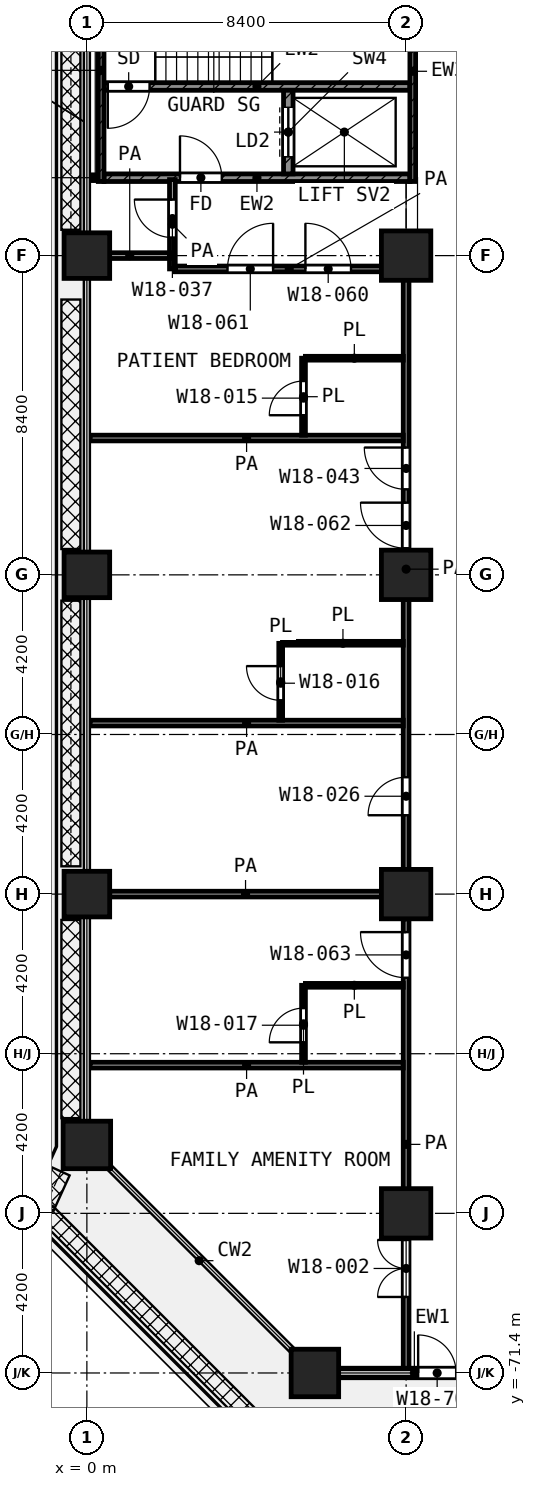
"""IFC4 building model, lengths in metres.
Left out: names, types, materials, properties, quantities, classifications, styles, units other than length and angle.
Written with IfcOpenShell. Run it as: python <this file> out.ifc"""

import sys

from ifc_helpers import new_model, si_unit, direction, frame, frame_2d, origin, origin_2d, place, context, subcontext, project, spatial, rectangle, extrude, element, fill, save


model = new_model("IFC4")
c1 = context("Model", 3, precision=1e-05, world=origin(), true_north=direction((0.0, 1.0)))
c2 = subcontext(c1, "Body", "Model", "MODEL_VIEW")
j1 = project(units=[si_unit("LENGTHUNIT", "METRE"), si_unit("PLANEANGLEUNIT", "RADIAN")], contexts=[c1])
p1 = place(None, origin())
s1 = spatial("IfcSite", under=j1, at=p1, CompositionType="ELEMENT")
p2 = place(p1, origin())
s2 = spatial("IfcBuilding", under=s1, at=p2, CompositionType="ELEMENT")
p3 = place(p2, frame((0.0, 0.0, 81.2)))
s3 = spatial("IfcBuildingStorey", under=s2, at=p3, CompositionType="ELEMENT", Elevation=81.2)
p4 = place(p3, frame((0.0, -42.0, 0.0), z_axis=(0.0, 0.0, 1.0), x_axis=(1.0, 0.0, 0.0)))
e1 = element("IfcColumn", 1, at=p4, inside=s3, PredefinedType="COLUMN", context=c2, shape_type="SweptSolid", body=[
    extrude(rectangle(XDim=1.2, YDim=1.2, at=origin_2d()), origin(), (0.0, 0.0, 1.0), 4.2),
])
p5 = place(p3, frame((8.4, -42.0, 0.0), z_axis=(0.0, 0.0, 1.0), x_axis=(1.0, 0.0, 0.0)))
e2 = element("IfcColumn", 2, at=p5, inside=s3, PredefinedType="COLUMN", context=c2, shape_type="SweptSolid", body=[
    extrude(rectangle(XDim=1.3, YDim=1.3, at=origin_2d()), origin(), (0.0, 0.0, 1.0), 4.2),
])
p6 = place(p3, frame((0.0, -50.4, 0.0), z_axis=(0.0, 0.0, 1.0), x_axis=(1.0, 0.0, 0.0)))
e3 = element("IfcColumn", 3, at=p6, inside=s3, PredefinedType="COLUMN", context=c2, shape_type="SweptSolid", body=[
    extrude(rectangle(XDim=1.2, YDim=1.2, at=origin_2d()), origin(), (0.0, 0.0, 1.0), 4.2),
])
p7 = place(p3, frame((8.4, -50.4, 0.0), z_axis=(0.0, 0.0, 1.0), x_axis=(1.0, 0.0, 0.0)))
e4 = element("IfcColumn", 4, at=p7, inside=s3, PredefinedType="COLUMN", context=c2, shape_type="SweptSolid", body=[
    extrude(rectangle(XDim=1.3, YDim=1.3, at=origin_2d()), origin(), (0.0, 0.0, 1.0), 4.2),
])
p8 = place(p3, frame((0.0, -58.8, 0.0), z_axis=(0.0, 0.0, 1.0), x_axis=(1.0, 0.0, 0.0)))
e5 = element("IfcColumn", 5, at=p8, inside=s3, PredefinedType="COLUMN", context=c2, shape_type="SweptSolid", body=[
    extrude(rectangle(XDim=1.2, YDim=1.2, at=origin_2d()), origin(), (0.0, 0.0, 1.0), 4.2),
])
p9 = place(p3, frame((8.4, -58.8, 0.0), z_axis=(0.0, 0.0, 1.0), x_axis=(1.0, 0.0, 0.0)))
e6 = element("IfcColumn", 6, at=p9, inside=s3, PredefinedType="COLUMN", context=c2, shape_type="SweptSolid", body=[
    extrude(rectangle(XDim=1.3, YDim=1.3, at=origin_2d()), origin(), (0.0, 0.0, 1.0), 4.2),
])
p10 = place(p3, frame((0.0, -65.4, 0.0), z_axis=(0.0, 0.0, 1.0), x_axis=(1.0, 0.0, 0.0)))
e7 = element("IfcColumn", 7, at=p10, inside=s3, PredefinedType="COLUMN", context=c2, shape_type="SweptSolid", body=[
    extrude(rectangle(XDim=1.25, YDim=1.25, at=origin_2d()), origin(), (0.0, 0.0, 1.0), 4.2),
])
p11 = place(p3, frame((8.4, -67.2, 0.0), z_axis=(0.0, 0.0, 1.0), x_axis=(1.0, 0.0, 0.0)))
e8 = element("IfcColumn", 8, at=p11, inside=s3, PredefinedType="COLUMN", context=c2, shape_type="SweptSolid", body=[
    extrude(rectangle(XDim=1.3, YDim=1.3, at=origin_2d()), origin(), (0.0, 0.0, 1.0), 4.2),
])
p12 = place(p3, frame((6.0, -71.4, 0.0), z_axis=(0.0, 0.0, 1.0), x_axis=(1.0, 0.0, 0.0)))
e9 = element("IfcColumn", 9, at=p12, inside=s3, PredefinedType="COLUMN", context=c2, shape_type="SweptSolid", body=[
    extrude(rectangle(XDim=1.25, YDim=1.25, at=origin_2d()), origin(), (0.0, 0.0, 1.0), 4.2),
])
p13 = place(p3, frame((6.625, -71.4, 0.0), z_axis=(0.0, 0.0, 1.0), x_axis=(1.0, 0.0, 0.0)))
e10 = element("IfcWall", 10, at=p13, inside=s3, PredefinedType="SOLIDWALL", context=c2, shape_type="SweptSolid", body=[
    extrude(rectangle(XDim=3.983, YDim=0.25, at=frame_2d((1.992, 0.0))), origin(), (0.0, 0.0, 1.0), 3.78),
])
p14 = place(p13, frame((2.092, 0.0, 0.0)))
e11 = element("IfcOpeningElement", 11, at=p14, cuts=e10, PredefinedType="OPENING", context=c2, shape_type="SweptSolid", body=[
    extrude(rectangle(XDim=1.0, YDim=2.1, at=frame_2d((0.5, 1.05))), frame((0.0, 0.135, 0.0), z_axis=(0.0, -1.0, 0.0), x_axis=(1.0, 0.0, 0.0)), (0.0, 0.0, 1.0), 0.27),
])
p15 = place(p3, frame((0.375, -40.05, 0.0), z_axis=(0.0, 0.0, 1.0), x_axis=(0.0, 1.0, 0.0)))
e12 = element("IfcWall", 12, at=p15, inside=s3, PredefinedType="SHEAR", context=c2, shape_type="SweptSolid", body=[
    extrude(rectangle(XDim=5.85, YDim=0.15, at=frame_2d((2.925, 0.0))), origin(), (0.0, 0.0, 1.0), 3.9),
])
p16 = place(p3, frame((8.575, -40.05, 0.0), z_axis=(0.0, 0.0, 1.0), x_axis=(0.0, 1.0, 0.0)))
e13 = element("IfcWall", 13, at=p16, inside=s3, PredefinedType="SHEAR", context=c2, shape_type="SweptSolid", body=[
    extrude(rectangle(XDim=5.8, YDim=0.15, at=frame_2d((2.9, 0.0))), origin(), (0.0, 0.0, 1.0), 3.9),
])
p17 = place(p3, frame((0.45, -37.55, 0.0), z_axis=(0.0, 0.0, 1.0), x_axis=(1.0, 0.0, 0.0)))
e14 = element("IfcWall", 14, at=p17, inside=s3, PredefinedType="SHEAR", context=c2, shape_type="SweptSolid", body=[
    extrude(rectangle(XDim=8.05, YDim=0.2, at=frame_2d((4.025, 0.0))), origin(), (0.0, 0.0, 1.0), 3.9),
])
p18 = place(p17, frame((0.1, 0.0, 0.0)))
e15 = element("IfcOpeningElement", 15, at=p18, cuts=e14, PredefinedType="OPENING", context=c2, shape_type="SweptSolid", body=[
    extrude(rectangle(XDim=1.1, YDim=2.1, at=frame_2d((0.55, 1.05))), frame((0.0, 0.11, 0.0), z_axis=(0.0, -1.0, 0.0), x_axis=(1.0, 0.0, 0.0)), (0.0, 0.0, 1.0), 0.22),
])
p19 = place(p3, frame((0.45, -39.95, 0.0), z_axis=(0.0, 0.0, 1.0), x_axis=(1.0, 0.0, 0.0)))
e16 = element("IfcWall", 16, at=p19, inside=s3, PredefinedType="SHEAR", context=c2, shape_type="SweptSolid", body=[
    extrude(rectangle(XDim=8.05, YDim=0.2, at=frame_2d((4.025, 0.0))), origin(), (0.0, 0.0, 1.0), 3.9),
])
p20 = place(p19, frame((2.0, 0.0, 0.0)))
e17 = element("IfcOpeningElement", 17, at=p20, cuts=e16, PredefinedType="OPENING", context=c2, shape_type="SweptSolid", body=[
    extrude(rectangle(XDim=1.1, YDim=2.1, at=frame_2d((0.55, 1.05))), frame((0.0, 0.11, 0.0), z_axis=(0.0, -1.0, 0.0), x_axis=(1.0, 0.0, 0.0)), (0.0, 0.0, 1.0), 0.22),
])
p21 = place(p3, frame((5.3, -39.85, 0.0), z_axis=(0.0, 0.0, 1.0), x_axis=(0.0, 1.0, 0.0)))
e18 = element("IfcWall", 18, at=p21, inside=s3, PredefinedType="SHEAR", context=c2, shape_type="SweptSolid", body=[
    extrude(rectangle(XDim=2.2, YDim=0.25, at=frame_2d((1.1, 0.0))), origin(), (0.0, 0.0, 1.0), 3.9),
])
p22 = place(p21, frame((0.45, 0.0, 0.0)))
e19 = element("IfcOpeningElement", 19, at=p22, cuts=e18, PredefinedType="OPENING", context=c2, shape_type="SweptSolid", body=[
    extrude(rectangle(XDim=1.3, YDim=2.1, at=frame_2d((0.65, 1.05))), frame((0.0, 0.135, 0.0), z_axis=(0.0, -1.0, 0.0), x_axis=(1.0, 0.0, 0.0)), (0.0, 0.0, 1.0), 0.27),
])
p23 = place(p3, frame((5.75, -61.2, 0.0), z_axis=(0.0, 0.0, 1.0), x_axis=(1.0, 0.0, 0.0)))
e20 = element("IfcWall", 20, at=p23, inside=s3, PredefinedType="PARTITIONING", context=c2, shape_type="SweptSolid", body=[
    extrude(rectangle(XDim=2.575, YDim=0.1, at=frame_2d((1.288, 0.0))), origin(), (0.0, 0.0, 1.0), 3.9),
])
p24 = place(p3, frame((5.151, -52.2, 0.0), z_axis=(0.0, 0.0, 1.0), x_axis=(1.0, 0.0, 0.0)))
e21 = element("IfcWall", 21, at=p24, inside=s3, PredefinedType="PARTITIONING", context=c2, shape_type="SweptSolid", body=[
    extrude(rectangle(XDim=3.174, YDim=0.1, at=frame_2d((1.587, 0.0))), origin(), (0.0, 0.0, 1.0), 3.9),
])
p25 = place(p3, frame((5.75, -44.7, 0.0), z_axis=(0.0, 0.0, 1.0), x_axis=(1.0, 0.0, 0.0)))
e22 = element("IfcWall", 22, at=p25, inside=s3, PredefinedType="PARTITIONING", context=c2, shape_type="SweptSolid", body=[
    extrude(rectangle(XDim=2.575, YDim=0.1, at=frame_2d((1.288, 0.0))), origin(), (0.0, 0.0, 1.0), 3.9),
])
p26 = place(p3, frame((5.1, -54.225, 0.0), z_axis=(0.0, 0.0, 1.0), x_axis=(0.0, 1.0, 0.0)))
e23 = element("IfcWall", 23, at=p26, inside=s3, PredefinedType="PARTITIONING", context=c2, shape_type="SweptSolid", body=[
    extrude(rectangle(XDim=2.023, YDim=0.1, at=frame_2d((1.012, 0.0))), origin(), (0.0, 0.0, 1.0), 3.9),
])
p27 = place(p26, frame((0.524, 0.0, 0.0)))
e24 = element("IfcOpeningElement", 24, at=p27, cuts=e23, PredefinedType="OPENING", context=c2, shape_type="SweptSolid", body=[
    extrude(rectangle(XDim=0.9, YDim=2.1, at=frame_2d((0.45, 1.05))), frame((0.0, 0.06, 0.0), z_axis=(0.0, -1.0, 0.0), x_axis=(1.0, 0.0, 0.0)), (0.0, 0.0, 1.0), 0.12),
])
p28 = place(p3, frame((5.7, -63.225, 0.0), z_axis=(0.0, 0.0, 1.0), x_axis=(0.0, 1.0, 0.0)))
e25 = element("IfcWall", 25, at=p28, inside=s3, PredefinedType="PARTITIONING", context=c2, shape_type="SweptSolid", body=[
    extrude(rectangle(XDim=2.025, YDim=0.1, at=frame_2d((1.013, 0.0))), origin(), (0.0, 0.0, 1.0), 3.9),
])
p29 = place(p28, frame((0.525, 0.0, 0.0)))
e26 = element("IfcOpeningElement", 26, at=p29, cuts=e25, PredefinedType="OPENING", context=c2, shape_type="SweptSolid", body=[
    extrude(rectangle(XDim=0.9, YDim=2.1, at=frame_2d((0.45, 1.05))), frame((0.0, 0.06, 0.0), z_axis=(0.0, -1.0, 0.0), x_axis=(1.0, 0.0, 0.0)), (0.0, 0.0, 1.0), 0.12),
])
p30 = place(p3, frame((5.7, -46.725, 0.0), z_axis=(0.0, 0.0, 1.0), x_axis=(0.0, 1.0, 0.0)))
e27 = element("IfcWall", 27, at=p30, inside=s3, PredefinedType="PARTITIONING", context=c2, shape_type="SweptSolid", body=[
    extrude(rectangle(XDim=2.025, YDim=0.1, at=frame_2d((1.013, 0.0))), origin(), (0.0, 0.0, 1.0), 3.9),
])
p31 = place(p30, frame((0.525, 0.0, 0.0)))
e28 = element("IfcOpeningElement", 28, at=p31, cuts=e27, PredefinedType="OPENING", context=c2, shape_type="SweptSolid", body=[
    extrude(rectangle(XDim=0.9, YDim=2.1, at=frame_2d((0.45, 1.05))), frame((0.0, 0.06, 0.0), z_axis=(0.0, -1.0, 0.0), x_axis=(1.0, 0.0, 0.0)), (0.0, 0.0, 1.0), 0.12),
])
p32 = place(p3, frame((0.08, -63.3, 0.0), z_axis=(0.0, 0.0, 1.0), x_axis=(1.0, 0.0, 0.0)))
e29 = element("IfcWall", 29, at=p32, inside=s3, PredefinedType="PARTITIONING", context=c2, shape_type="SweptSolid", body=[
    extrude(rectangle(XDim=8.245, YDim=0.15, at=frame_2d((4.123, 0.0))), origin(), (0.0, 0.0, 1.0), 3.9),
])
p33 = place(p3, frame((0.6, -58.8, 0.0), z_axis=(0.0, 0.0, 1.0), x_axis=(1.0, 0.0, 0.0)))
e30 = element("IfcWall", 30, at=p33, inside=s3, PredefinedType="PARTITIONING", context=c2, shape_type="SweptSolid", body=[
    extrude(rectangle(XDim=7.15, YDim=0.15, at=frame_2d((3.575, 0.0))), origin(), (0.0, 0.0, 1.0), 3.9),
])
for number, where, z_axis, x_axis in (
    (31, (0.08, -54.3, 0.0), (0.0, 0.0, 1.0), (1.0, 0.0, 0.0)),
    (32, (0.08, -46.8, 0.0), (0.0, 0.0, 1.0), (1.0, 0.0, 0.0)),
):
    element("IfcWall", number, at=place(p3, frame(where, z_axis=z_axis, x_axis=x_axis)), inside=s3, PredefinedType="PARTITIONING", context=c2, shape_type="SweptSolid", body=[
        extrude(rectangle(XDim=8.245, YDim=0.15, at=frame_2d((4.123, 0.0))), origin(), (0.0, 0.0, 1.0), 3.9),
    ])
p34 = place(p3, frame((2.325, -42.35, 0.0), z_axis=(0.0, 0.0, 1.0), x_axis=(1.0, 0.0, 0.0)))
e33 = element("IfcWall", 33, at=p34, inside=s3, PredefinedType="PARTITIONING", context=c2, shape_type="SweptSolid", body=[
    extrude(rectangle(XDim=6.0, YDim=0.15, at=frame_2d((3.0, 0.0))), origin(), (0.0, 0.0, 1.0), 3.9),
])
p35 = place(p34, frame((3.425, 0.0, 0.0)))
e34 = element("IfcOpeningElement", 34, at=p35, cuts=e33, PredefinedType="OPENING", context=c2, shape_type="SweptSolid", body=[
    extrude(rectangle(XDim=1.2, YDim=2.1, at=frame_2d((0.6, 1.05))), frame((0.0, 0.085, 0.0), z_axis=(0.0, -1.0, 0.0), x_axis=(1.0, 0.0, 0.0)), (0.0, 0.0, 1.0), 0.17),
])
p36 = place(p34, frame((1.375, 0.0, 0.0)))
e35 = element("IfcOpeningElement", 35, at=p36, cuts=e33, PredefinedType="OPENING", context=c2, shape_type="SweptSolid", body=[
    extrude(rectangle(XDim=1.2, YDim=2.1, at=frame_2d((0.6, 1.05))), frame((0.0, 0.085, 0.0), z_axis=(0.0, -1.0, 0.0), x_axis=(1.0, 0.0, 0.0)), (0.0, 0.0, 1.0), 0.17),
])
p37 = place(p3, frame((0.08, -42.0, 0.0), z_axis=(0.0, 0.0, 1.0), x_axis=(1.0, 0.0, 0.0)))
e36 = element("IfcWall", 36, at=p37, inside=s3, PredefinedType="PARTITIONING", context=c2, shape_type="SweptSolid", body=[
    extrude(rectangle(XDim=2.095, YDim=0.15, at=frame_2d((1.047, 0.0))), origin(), (0.0, 0.0, 1.0), 3.9),
])
p38 = place(p3, frame((0.08, -39.95, 0.0), z_axis=(0.0, 0.0, 1.0), x_axis=(1.0, 0.0, 0.0)))
e37 = element("IfcWall", 37, at=p38, inside=s3, PredefinedType="PARTITIONING", context=c2, shape_type="SweptSolid", body=[
    extrude(rectangle(XDim=0.19, YDim=0.15, at=frame_2d((0.095, 0.0))), origin(), (0.0, 0.0, 1.0), 3.9),
])
p39 = place(p3, frame((2.25, -42.35, 0.0), z_axis=(0.0, 0.0, 1.0), x_axis=(0.0, 1.0, 0.0)))
e38 = element("IfcWall", 38, at=p39, inside=s3, PredefinedType="PARTITIONING", context=c2, shape_type="SweptSolid", body=[
    extrude(rectangle(XDim=2.35, YDim=0.15, at=frame_2d((1.175, 0.0))), origin(), (0.0, 0.0, 1.0), 3.9),
])
p40 = place(p39, frame((0.825, 0.0, 0.0)))
e39 = element("IfcOpeningElement", 39, at=p40, cuts=e38, PredefinedType="OPENING", context=c2, shape_type="SweptSolid", body=[
    extrude(rectangle(XDim=1.0, YDim=2.1, at=frame_2d((0.5, 1.05))), frame((0.0, 0.085, 0.0), z_axis=(0.0, -1.0, 0.0), x_axis=(1.0, 0.0, 0.0)), (0.0, 0.0, 1.0), 0.17),
])
p41 = place(p3, frame((8.4, -71.32, 0.0), z_axis=(0.0, 0.0, 1.0), x_axis=(0.0, 1.0, 0.0)))
e40 = element("IfcWall", 40, at=p41, inside=s3, PredefinedType="PARTITIONING", context=c2, shape_type="SweptSolid", body=[
    extrude(rectangle(XDim=11.87, YDim=0.15, at=frame_2d((5.935, 0.0))), origin(), (0.0, 0.0, 1.0), 3.9),
])
p42 = place(p41, frame((10.32, 0.0, 0.0)))
e41 = element("IfcOpeningElement", 41, at=p42, cuts=e40, PredefinedType="OPENING", context=c2, shape_type="SweptSolid", body=[
    extrude(rectangle(XDim=1.2, YDim=2.1, at=frame_2d((0.6, 1.05))), frame((0.0, 0.085, 0.0), z_axis=(0.0, -1.0, 0.0), x_axis=(1.0, 0.0, 0.0)), (0.0, 0.0, 1.0), 0.17),
])
p43 = place(p41, frame((1.92, 0.0, 0.0)))
e42 = element("IfcOpeningElement", 42, at=p43, cuts=e40, PredefinedType="OPENING", context=c2, shape_type="SweptSolid", body=[
    extrude(rectangle(XDim=1.5, YDim=2.1, at=frame_2d((0.75, 1.05))), frame((0.0, 0.085, 0.0), z_axis=(0.0, -1.0, 0.0), x_axis=(1.0, 0.0, 0.0)), (0.0, 0.0, 1.0), 0.17),
])
p44 = place(p3, frame((8.4, -58.15, 0.0), z_axis=(0.0, 0.0, 1.0), x_axis=(0.0, 1.0, 0.0)))
e43 = element("IfcWall", 43, at=p44, inside=s3, PredefinedType="PARTITIONING", context=c2, shape_type="SweptSolid", body=[
    extrude(rectangle(XDim=15.8, YDim=0.15, at=frame_2d((7.9, 0.0))), origin(), (0.0, 0.0, 1.0), 3.9),
])
p45 = place(p44, frame((8.45, 0.0, 0.0)))
e44 = element("IfcOpeningElement", 44, at=p45, cuts=e43, PredefinedType="OPENING", context=c2, shape_type="SweptSolid", body=[
    extrude(rectangle(XDim=1.2, YDim=2.1, at=frame_2d((0.6, 1.05))), frame((0.0, 0.085, 0.0), z_axis=(0.0, -1.0, 0.0), x_axis=(1.0, 0.0, 0.0)), (0.0, 0.0, 1.0), 0.17),
])
p46 = place(p44, frame((10.0, 0.0, 0.0)))
e45 = element("IfcOpeningElement", 45, at=p46, cuts=e43, PredefinedType="OPENING", context=c2, shape_type="SweptSolid", body=[
    extrude(rectangle(XDim=1.1, YDim=2.1, at=frame_2d((0.55, 1.05))), frame((0.0, 0.085, 0.0), z_axis=(0.0, -1.0, 0.0), x_axis=(1.0, 0.0, 0.0)), (0.0, 0.0, 1.0), 0.17),
])
p47 = place(p44, frame((1.425, 0.0, 0.0)))
e46 = element("IfcOpeningElement", 46, at=p47, cuts=e43, PredefinedType="OPENING", context=c2, shape_type="SweptSolid", body=[
    extrude(rectangle(XDim=1.0, YDim=2.1, at=frame_2d((0.5, 1.05))), frame((0.0, 0.085, 0.0), z_axis=(0.0, -1.0, 0.0), x_axis=(1.0, 0.0, 0.0)), (0.0, 0.0, 1.0), 0.17),
])
p48 = place(p14, origin())
e47 = element("IfcDoor", 47, at=p48, inside=s3, OperationType="SINGLE_SWING_LEFT", PredefinedType="DOOR", context=c2, shape_type="SweptSolid", body=[
    extrude(rectangle(XDim=1.0, YDim=2.1, at=frame_2d((0.5, 1.05))), frame((0.0, 0.025, 0.0), z_axis=(0.0, -1.0, 0.0), x_axis=(1.0, 0.0, 0.0)), (0.0, 0.0, 1.0), 0.05),
])
fill(e11, e47)
p49 = place(p18, frame((1.1, 0.0, 0.0), z_axis=(0.0, 0.0, 1.0), x_axis=(-1.0, 0.0, 0.0)))
e48 = element("IfcDoor", 48, at=p49, inside=s3, OperationType="SINGLE_SWING_LEFT", PredefinedType="DOOR", context=c2, shape_type="SweptSolid", body=[
    extrude(rectangle(XDim=1.1, YDim=2.1, at=frame_2d((0.55, 1.05))), frame((0.0, 0.025, 0.0), z_axis=(0.0, -1.0, 0.0), x_axis=(1.0, 0.0, 0.0)), (0.0, 0.0, 1.0), 0.05),
])
fill(e15, e48)
p50 = place(p22, origin())
e49 = element("IfcDoor", 49, at=p50, inside=s3, OperationType="DOUBLE_DOOR_SLIDING", PredefinedType="DOOR", context=c2, shape_type="SweptSolid", body=[
    extrude(rectangle(XDim=1.3, YDim=2.1, at=frame_2d((0.65, 1.05))), frame((0.0, 0.025, 0.0), z_axis=(0.0, -1.0, 0.0), x_axis=(1.0, 0.0, 0.0)), (0.0, 0.0, 1.0), 0.05),
])
fill(e19, e49)
p51 = place(p20, origin())
e50 = element("IfcDoor", 50, at=p51, inside=s3, OperationType="SINGLE_SWING_LEFT", PredefinedType="DOOR", context=c2, shape_type="SweptSolid", body=[
    extrude(rectangle(XDim=1.1, YDim=2.1, at=frame_2d((0.55, 1.05))), frame((0.0, 0.025, 0.0), z_axis=(0.0, -1.0, 0.0), x_axis=(1.0, 0.0, 0.0)), (0.0, 0.0, 1.0), 0.05),
])
fill(e17, e50)
p52 = place(p40, origin())
e51 = element("IfcDoor", 51, at=p52, inside=s3, OperationType="SINGLE_SWING_RIGHT", PredefinedType="DOOR", context=c2, shape_type="SweptSolid", body=[
    extrude(rectangle(XDim=1.0, YDim=2.1, at=frame_2d((0.5, 1.05))), frame((0.0, 0.025, 0.0), z_axis=(0.0, -1.0, 0.0), x_axis=(1.0, 0.0, 0.0)), (0.0, 0.0, 1.0), 0.05),
])
fill(e39, e51)
p53 = place(p35, origin())
e52 = element("IfcDoor", 52, at=p53, inside=s3, OperationType="SINGLE_SWING_LEFT", PredefinedType="DOOR", context=c2, shape_type="SweptSolid", body=[
    extrude(rectangle(XDim=1.2, YDim=2.1, at=frame_2d((0.6, 1.05))), frame((0.0, 0.025, 0.0), z_axis=(0.0, -1.0, 0.0), x_axis=(1.0, 0.0, 0.0)), (0.0, 0.0, 1.0), 0.05),
])
fill(e34, e52)
p54 = place(p36, origin())
e53 = element("IfcDoor", 53, at=p54, inside=s3, OperationType="SINGLE_SWING_RIGHT", PredefinedType="DOOR", context=c2, shape_type="SweptSolid", body=[
    extrude(rectangle(XDim=1.2, YDim=2.1, at=frame_2d((0.6, 1.05))), frame((0.0, 0.025, 0.0), z_axis=(0.0, -1.0, 0.0), x_axis=(1.0, 0.0, 0.0)), (0.0, 0.0, 1.0), 0.05),
])
fill(e35, e53)
p55 = place(p31, origin())
e54 = element("IfcDoor", 54, at=p55, inside=s3, OperationType="SINGLE_SWING_LEFT", PredefinedType="DOOR", context=c2, shape_type="SweptSolid", body=[
    extrude(rectangle(XDim=0.9, YDim=2.1, at=frame_2d((0.45, 1.05))), frame((0.0, 0.025, 0.0), z_axis=(0.0, -1.0, 0.0), x_axis=(1.0, 0.0, 0.0)), (0.0, 0.0, 1.0), 0.05),
])
fill(e28, e54)
p56 = place(p45, origin())
e55 = element("IfcDoor", 55, at=p56, inside=s3, OperationType="SINGLE_SWING_RIGHT", PredefinedType="DOOR", context=c2, shape_type="SweptSolid", body=[
    extrude(rectangle(XDim=1.2, YDim=2.1, at=frame_2d((0.6, 1.05))), frame((0.0, 0.025, 0.0), z_axis=(0.0, -1.0, 0.0), x_axis=(1.0, 0.0, 0.0)), (0.0, 0.0, 1.0), 0.05),
])
fill(e44, e55)
p57 = place(p46, origin())
e56 = element("IfcDoor", 56, at=p57, inside=s3, OperationType="SINGLE_SWING_RIGHT", PredefinedType="DOOR", context=c2, shape_type="SweptSolid", body=[
    extrude(rectangle(XDim=1.1, YDim=2.1, at=frame_2d((0.55, 1.05))), frame((0.0, 0.025, 0.0), z_axis=(0.0, -1.0, 0.0), x_axis=(1.0, 0.0, 0.0)), (0.0, 0.0, 1.0), 0.05),
])
fill(e45, e56)
p58 = place(p27, origin())
e57 = element("IfcDoor", 57, at=p58, inside=s3, OperationType="SINGLE_SWING_RIGHT", PredefinedType="DOOR", context=c2, shape_type="SweptSolid", body=[
    extrude(rectangle(XDim=0.9, YDim=2.1, at=frame_2d((0.45, 1.05))), frame((0.0, 0.025, 0.0), z_axis=(0.0, -1.0, 0.0), x_axis=(1.0, 0.0, 0.0)), (0.0, 0.0, 1.0), 0.05),
])
fill(e24, e57)
p59 = place(p47, origin())
e58 = element("IfcDoor", 58, at=p59, inside=s3, OperationType="SINGLE_SWING_LEFT", PredefinedType="DOOR", context=c2, shape_type="SweptSolid", body=[
    extrude(rectangle(XDim=1.0, YDim=2.1, at=frame_2d((0.5, 1.05))), frame((0.0, 0.025, 0.0), z_axis=(0.0, -1.0, 0.0), x_axis=(1.0, 0.0, 0.0)), (0.0, 0.0, 1.0), 0.05),
])
fill(e46, e58)
p60 = place(p42, origin())
e59 = element("IfcDoor", 59, at=p60, inside=s3, OperationType="SINGLE_SWING_RIGHT", PredefinedType="DOOR", context=c2, shape_type="SweptSolid", body=[
    extrude(rectangle(XDim=1.2, YDim=2.1, at=frame_2d((0.6, 1.05))), frame((0.0, 0.025, 0.0), z_axis=(0.0, -1.0, 0.0), x_axis=(1.0, 0.0, 0.0)), (0.0, 0.0, 1.0), 0.05),
])
fill(e41, e59)
p61 = place(p29, origin())
e60 = element("IfcDoor", 60, at=p61, inside=s3, OperationType="SINGLE_SWING_LEFT", PredefinedType="DOOR", context=c2, shape_type="SweptSolid", body=[
    extrude(rectangle(XDim=0.9, YDim=2.1, at=frame_2d((0.45, 1.05))), frame((0.0, 0.025, 0.0), z_axis=(0.0, -1.0, 0.0), x_axis=(1.0, 0.0, 0.0)), (0.0, 0.0, 1.0), 0.05),
])
fill(e26, e60)
p62 = place(p43, origin())
e61 = element("IfcDoor", 61, at=p62, inside=s3, OperationType="DOUBLE_DOOR_SINGLE_SWING", PredefinedType="DOOR", context=c2, shape_type="SweptSolid", body=[
    extrude(rectangle(XDim=1.5, YDim=2.1, at=frame_2d((0.75, 1.05))), frame((0.0, 0.025, 0.0), z_axis=(0.0, -1.0, 0.0), x_axis=(1.0, 0.0, 0.0)), (0.0, 0.0, 1.0), 0.05),
])
fill(e42, e61)
save(model, sys.argv[1])
